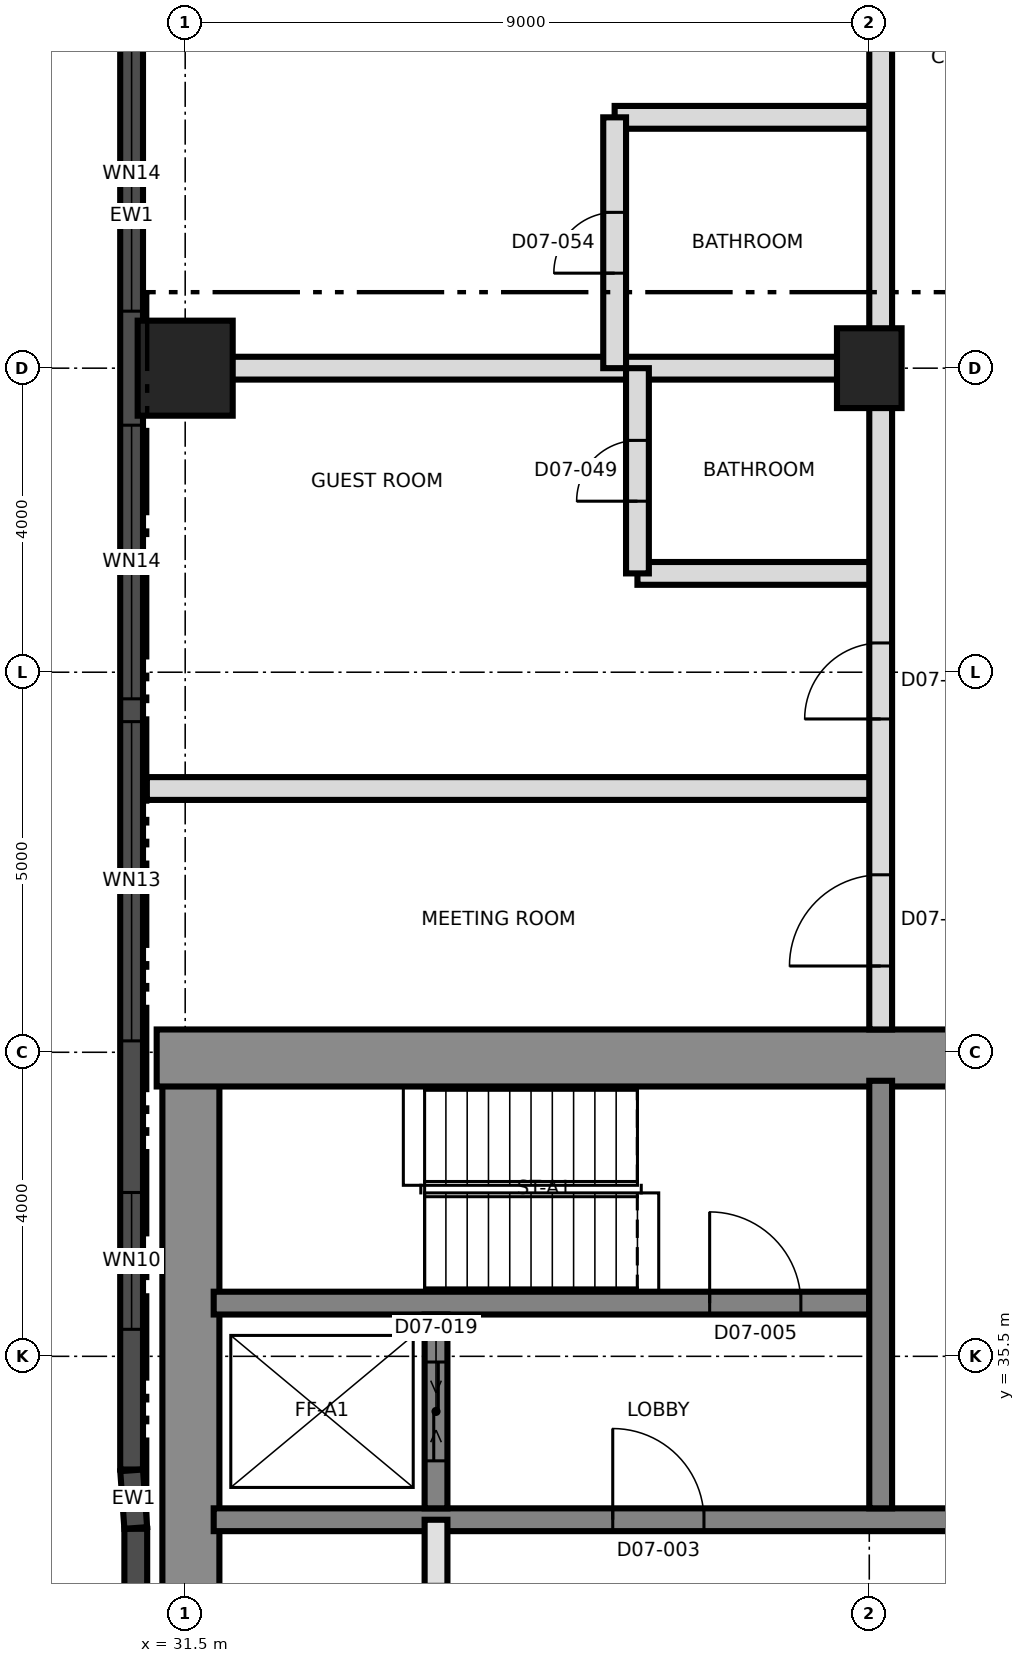
"""IFC4 building model, lengths in metres.
Left out: names, types, materials, properties, quantities, classifications, styles, units other than length and angle.
Written with IfcOpenShell. Run it as: python <this file> out.ifc"""

import sys

from ifc_helpers import new_model, si_unit, direction, frame, frame_2d, origin, origin_2d, place, context, subcontext, project, spatial, rectangle, extrude, element, fill, save


model = new_model("IFC4")
c1 = context("Model", 3, precision=1e-05, world=origin(), true_north=direction((0.0, 1.0)))
c2 = subcontext(c1, "Body", "Model", "MODEL_VIEW")
j1 = project(units=[si_unit("LENGTHUNIT", "METRE"), si_unit("PLANEANGLEUNIT", "RADIAN")], contexts=[c1])
p1 = place(None, origin())
s1 = spatial("IfcSite", under=j1, at=p1, CompositionType="ELEMENT")
p2 = place(p1, origin())
s2 = spatial("IfcBuilding", under=s1, at=p2, CompositionType="ELEMENT")
p3 = place(p2, frame((0.0, 0.0, 87.1)))
s3 = spatial("IfcBuildingStorey", under=s2, at=p3, CompositionType="ELEMENT", Elevation=87.1)
p4 = place(p3, frame((31.575, 21.875, 0.0), z_axis=(0.0, 0.0, 1.0), x_axis=(0.0, 1.0, 0.0)))
e1 = element("IfcWall", 1, at=p4, inside=s3, PredefinedType="SHEAR", context=c2, shape_type="SweptSolid", body=[
    extrude(rectangle(XDim=17.25, YDim=0.75, at=frame_2d((8.625, 0.0))), origin(), (0.0, 0.0, 1.0), 3.7),
])
p5 = place(p3, frame((31.125, 39.425, 0.0), z_axis=(0.0, 0.0, 1.0), x_axis=(1.0, 0.0, 0.0)))
e2 = element("IfcWall", 2, at=p5, inside=s3, PredefinedType="SHEAR", context=c2, shape_type="SweptSolid", body=[
    extrude(rectangle(XDim=27.0, YDim=0.75, at=frame_2d((13.5, 0.0))), origin(), (0.0, 0.0, 1.0), 3.7),
])
p6 = place(p5, frame((10.575, 0.0, 0.0)))
e3 = element("IfcOpeningElement", 3, at=p6, cuts=e2, PredefinedType="OPENING", context=c2, shape_type="SweptSolid", body=[
    extrude(rectangle(XDim=1.2, YDim=2.1, at=frame_2d((0.6, 1.05))), frame((0.0, 0.385, 0.0), z_axis=(0.0, -1.0, 0.0), x_axis=(1.0, 0.0, 0.0)), (0.0, 0.0, 1.0), 0.77),
])
p7 = place(p3, frame((31.875, 33.35, 0.0), z_axis=(0.0, 0.0, 1.0), x_axis=(1.0, 0.0, 0.0)))
e4 = element("IfcWall", 4, at=p7, inside=s3, PredefinedType="SHEAR", context=c2, shape_type="SweptSolid", body=[
    extrude(rectangle(XDim=26.25, YDim=0.3, at=frame_2d((13.125, 0.0))), origin(), (0.0, 0.0, 1.0), 3.7),
])
p8 = place(p7, frame((13.775, 0.0, 0.0)))
e5 = element("IfcOpeningElement", 5, at=p8, cuts=e4, PredefinedType="OPENING", context=c2, shape_type="SweptSolid", body=[
    extrude(rectangle(XDim=1.4, YDim=2.1, at=frame_2d((0.7, 1.05))), frame((0.0, 0.16, 0.0), z_axis=(0.0, -1.0, 0.0), x_axis=(1.0, 0.0, 0.0)), (0.0, 0.0, 1.0), 0.32),
])
p9 = place(p7, frame((5.25, 0.0, 0.0)))
e6 = element("IfcOpeningElement", 6, at=p9, cuts=e4, PredefinedType="OPENING", context=c2, shape_type="SweptSolid", body=[
    extrude(rectangle(XDim=1.2, YDim=2.1, at=frame_2d((0.6, 1.05))), frame((0.0, 0.16, 0.0), z_axis=(0.0, -1.0, 0.0), x_axis=(1.0, 0.0, 0.0)), (0.0, 0.0, 1.0), 0.32),
])
p10 = place(p7, frame((19.8, 0.0, 0.0)))
e7 = element("IfcOpeningElement", 7, at=p10, cuts=e4, PredefinedType="OPENING", context=c2, shape_type="SweptSolid", body=[
    extrude(rectangle(XDim=1.2, YDim=2.1, at=frame_2d((0.6, 1.05))), frame((0.0, 0.16, 0.0), z_axis=(0.0, -1.0, 0.0), x_axis=(1.0, 0.0, 0.0)), (0.0, 0.0, 1.0), 0.32),
])
p11 = place(p3, frame((31.875, 36.2, 0.0), z_axis=(0.0, 0.0, 1.0), x_axis=(1.0, 0.0, 0.0)))
e8 = element("IfcWall", 8, at=p11, inside=s3, PredefinedType="SHEAR", context=c2, shape_type="SweptSolid", body=[
    extrude(rectangle(XDim=8.625, YDim=0.3, at=frame_2d((4.312, 0.0))), origin(), (0.0, 0.0, 1.0), 3.7),
])
p12 = place(p11, frame((6.525, 0.0, 0.0)))
e9 = element("IfcOpeningElement", 9, at=p12, cuts=e8, PredefinedType="OPENING", context=c2, shape_type="SweptSolid", body=[
    extrude(rectangle(XDim=1.2, YDim=2.1, at=frame_2d((0.6, 1.05))), frame((0.0, 0.16, 0.0), z_axis=(0.0, -1.0, 0.0), x_axis=(1.0, 0.0, 0.0)), (0.0, 0.0, 1.0), 0.32),
])
p13 = place(p3, frame((40.65, 33.5, 0.0), z_axis=(0.0, 0.0, 1.0), x_axis=(0.0, 1.0, 0.0)))
e10 = element("IfcWall", 10, at=p13, inside=s3, PredefinedType="SHEAR", context=c2, shape_type="SweptSolid", body=[
    extrude(rectangle(XDim=5.625, YDim=0.3, at=frame_2d((2.812, 0.0))), origin(), (0.0, 0.0, 1.0), 3.7),
])
p14 = place(p3, frame((34.8, 33.5, 0.0), z_axis=(0.0, 0.0, 1.0), x_axis=(0.0, 1.0, 0.0)))
e11 = element("IfcWall", 11, at=p14, inside=s3, PredefinedType="SHEAR", context=c2, shape_type="SweptSolid", body=[
    extrude(rectangle(XDim=2.55, YDim=0.3, at=frame_2d((1.275, 0.0))), origin(), (0.0, 0.0, 1.0), 3.7),
])
p15 = place(p14, frame((0.625, 0.0, 0.0)))
e12 = element("IfcOpeningElement", 12, at=p15, cuts=e11, PredefinedType="OPENING", context=c2, shape_type="SweptSolid", body=[
    extrude(rectangle(XDim=1.3, YDim=2.4, at=frame_2d((0.65, 1.2))), frame((0.0, 0.16, 0.0), z_axis=(0.0, -1.0, 0.0), x_axis=(1.0, 0.0, 0.0)), (0.0, 0.0, 1.0), 0.32),
])
p16 = place(p3, frame((31.5, 48.5, 0.0), z_axis=(0.0, 0.0, 1.0), x_axis=(1.0, 0.0, 0.0)))
e13 = element("IfcColumn", 13, at=p16, inside=s3, PredefinedType="COLUMN", context=c2, shape_type="SweptSolid", body=[
    extrude(rectangle(XDim=1.25, YDim=1.25, at=origin_2d()), origin(), (0.0, 0.0, 1.0), 3.7),
])
p17 = place(p3, frame((40.5, 48.5, 0.0), z_axis=(0.0, 0.0, 1.0), x_axis=(0.0, 1.0, 0.0)))
e14 = element("IfcColumn", 14, at=p17, inside=s3, PredefinedType="COLUMN", context=c2, shape_type="SweptSolid", body=[
    extrude(rectangle(XDim=1.05, YDim=0.85, at=origin_2d()), origin(), (0.0, 0.0, 1.0), 3.7),
])
p18 = place(p3, frame((30.85, 33.231, 0.0), z_axis=(0.0, 0.0, 1.0), x_axis=(0.0, -1.0, 0.0)))
e15 = element("IfcWall", 15, at=p18, inside=s3, PredefinedType="SOLIDWALL", context=c2, shape_type="SweptSolid", body=[
    extrude(rectangle(XDim=11.871, YDim=0.3, at=frame_2d((5.936, 0.0))), origin(), (0.0, 0.0, 1.0), 3.4),
])
p19 = place(p3, frame((30.795, 66.992, 0.0), z_axis=(0.0, 0.0, 1.0), x_axis=(0.0, -1.0, 0.0)))
e16 = element("IfcWall", 16, at=p19, inside=s3, PredefinedType="SOLIDWALL", context=c2, shape_type="SweptSolid", body=[
    extrude(rectangle(XDim=32.981, YDim=0.3, at=frame_2d((16.491, 0.0))), origin(), (0.0, 0.0, 1.0), 3.4),
])
p20 = place(p19, frame((1.596, 0.0, 0.3)))
e17 = element("IfcOpeningElement", 17, at=p20, cuts=e16, PredefinedType="OPENING", context=c2, shape_type="SweptSolid", body=[
    extrude(rectangle(XDim=1.8, YDim=2.4, at=frame_2d((0.9, 1.2))), frame((0.0, 0.16, 0.0), z_axis=(0.0, -1.0, 0.0), x_axis=(1.0, 0.0, 0.0)), (0.0, 0.0, 1.0), 0.32),
])
p21 = place(p19, frame((5.142, 0.0, 0.9)))
e18 = element("IfcOpeningElement", 18, at=p21, cuts=e16, PredefinedType="OPENING", context=c2, shape_type="SweptSolid", body=[
    extrude(rectangle(XDim=3.6, YDim=1.7, at=frame_2d((1.8, 0.85))), frame((0.0, 0.16, 0.0), z_axis=(0.0, -1.0, 0.0), x_axis=(1.0, 0.0, 0.0)), (0.0, 0.0, 1.0), 0.32),
])
p22 = place(p19, frame((10.242, 0.0, 0.9)))
e19 = element("IfcOpeningElement", 19, at=p22, cuts=e16, PredefinedType="OPENING", context=c2, shape_type="SweptSolid", body=[
    extrude(rectangle(XDim=3.6, YDim=1.7, at=frame_2d((1.8, 0.85))), frame((0.0, 0.16, 0.0), z_axis=(0.0, -1.0, 0.0), x_axis=(1.0, 0.0, 0.0)), (0.0, 0.0, 1.0), 0.32),
])
p23 = place(p19, frame((14.142, 0.0, 0.9)))
e20 = element("IfcOpeningElement", 20, at=p23, cuts=e16, PredefinedType="OPENING", context=c2, shape_type="SweptSolid", body=[
    extrude(rectangle(XDim=3.6, YDim=1.7, at=frame_2d((1.8, 0.85))), frame((0.0, 0.16, 0.0), z_axis=(0.0, -1.0, 0.0), x_axis=(1.0, 0.0, 0.0)), (0.0, 0.0, 1.0), 0.32),
])
p24 = place(p19, frame((19.242, 0.0, 0.9)))
e21 = element("IfcOpeningElement", 21, at=p24, cuts=e16, PredefinedType="OPENING", context=c2, shape_type="SweptSolid", body=[
    extrude(rectangle(XDim=3.6, YDim=1.7, at=frame_2d((1.8, 0.85))), frame((0.0, 0.16, 0.0), z_axis=(0.0, -1.0, 0.0), x_axis=(1.0, 0.0, 0.0)), (0.0, 0.0, 1.0), 0.32),
])
p25 = place(p19, frame((23.142, 0.0, 0.9)))
e22 = element("IfcOpeningElement", 22, at=p25, cuts=e16, PredefinedType="OPENING", context=c2, shape_type="SweptSolid", body=[
    extrude(rectangle(XDim=4.2, YDim=1.7, at=frame_2d((2.1, 0.85))), frame((0.0, 0.16, 0.0), z_axis=(0.0, -1.0, 0.0), x_axis=(1.0, 0.0, 0.0)), (0.0, 0.0, 1.0), 0.32),
])
p26 = place(p19, frame((29.337, 0.0, 0.3)))
e23 = element("IfcOpeningElement", 23, at=p26, cuts=e16, PredefinedType="OPENING", context=c2, shape_type="SweptSolid", body=[
    extrude(rectangle(XDim=1.8, YDim=2.4, at=frame_2d((0.9, 1.2))), frame((0.0, 0.16, 0.0), z_axis=(0.0, -1.0, 0.0), x_axis=(1.0, 0.0, 0.0)), (0.0, 0.0, 1.0), 0.32),
])
p27 = place(p3, frame((30.795, 34.0, 0.0), z_axis=(0.0, 0.0, 1.0), x_axis=(0.07129269393, -0.997455438499, 0.0)))
e24 = element("IfcWall", 24, at=p27, inside=s3, PredefinedType="SOLIDWALL", context=c2, shape_type="SweptSolid", body=[
    extrude(rectangle(XDim=0.76, YDim=0.3, at=frame_2d((0.38, 0.0))), origin(), (0.0, 0.0, 1.0), 3.4),
])
p28 = place(p3, frame((34.8, 27.9, 0.0), z_axis=(0.0, 0.0, 1.0), x_axis=(0.0, 1.0, 0.0)))
e25 = element("IfcWall", 25, at=p28, inside=s3, PredefinedType="SOLIDWALL", context=c2, shape_type="SweptSolid", body=[
    extrude(rectangle(XDim=5.45, YDim=0.3, at=frame_2d((2.725, 0.0))), origin(), (0.0, 0.0, 1.0), 3.4),
])
p29 = place(p28, frame((3.6, 0.0, 0.0)))
e26 = element("IfcOpeningElement", 26, at=p29, cuts=e25, PredefinedType="OPENING", context=c2, shape_type="SweptSolid", body=[
    extrude(rectangle(XDim=1.0, YDim=2.1, at=frame_2d((0.5, 1.05))), frame((0.0, 0.16, 0.0), z_axis=(0.0, -1.0, 0.0), x_axis=(1.0, 0.0, 0.0)), (0.0, 0.0, 1.0), 0.32),
])
p30 = place(p3, frame((30.995, 42.97, 0.0), z_axis=(0.0, 0.0, 1.0), x_axis=(1.0, 0.0, 0.0)))
e27 = element("IfcWall", 27, at=p30, inside=s3, PredefinedType="PARTITIONING", context=c2, shape_type="SweptSolid", body=[
    extrude(rectangle(XDim=9.655, YDim=0.3, at=frame_2d((4.827, 0.0))), origin(), (0.0, 0.0, 1.0), 3.4),
])
p31 = place(p3, frame((37.45, 45.8, 0.0), z_axis=(0.0, 0.0, 1.0), x_axis=(1.0, 0.0, 0.0)))
e28 = element("IfcWall", 28, at=p31, inside=s3, PredefinedType="PARTITIONING", context=c2, shape_type="SweptSolid", body=[
    extrude(rectangle(XDim=3.2, YDim=0.3, at=frame_2d((1.6, 0.0))), origin(), (0.0, 0.0, 1.0), 3.4),
])
p32 = place(p3, frame((30.995, 48.5, 0.0), z_axis=(0.0, 0.0, 1.0), x_axis=(1.0, 0.0, 0.0)))
e29 = element("IfcWall", 29, at=p32, inside=s3, PredefinedType="PARTITIONING", context=c2, shape_type="SweptSolid", body=[
    extrude(rectangle(XDim=9.655, YDim=0.3, at=frame_2d((4.827, 0.0))), origin(), (0.0, 0.0, 1.0), 3.4),
])
p33 = place(p3, frame((37.15, 51.8, 0.0), z_axis=(0.0, 0.0, 1.0), x_axis=(1.0, 0.0, 0.0)))
e30 = element("IfcWall", 30, at=p33, inside=s3, PredefinedType="PARTITIONING", context=c2, shape_type="SweptSolid", body=[
    extrude(rectangle(XDim=3.5, YDim=0.3, at=frame_2d((1.75, 0.0))), origin(), (0.0, 0.0, 1.0), 3.4),
])
p34 = place(p3, frame((37.15, 48.5, 0.0), z_axis=(0.0, 0.0, 1.0), x_axis=(0.0, 1.0, 0.0)))
e31 = element("IfcWall", 31, at=p34, inside=s3, PredefinedType="PARTITIONING", context=c2, shape_type="SweptSolid", body=[
    extrude(rectangle(XDim=3.3, YDim=0.3, at=frame_2d((1.65, 0.0))), origin(), (0.0, 0.0, 1.0), 3.4),
])
p35 = place(p34, frame((1.25, 0.0, 0.0)))
e32 = element("IfcOpeningElement", 32, at=p35, cuts=e31, PredefinedType="OPENING", context=c2, shape_type="SweptSolid", body=[
    extrude(rectangle(XDim=0.8, YDim=2.1, at=frame_2d((0.4, 1.05))), frame((0.0, 0.16, 0.0), z_axis=(0.0, -1.0, 0.0), x_axis=(1.0, 0.0, 0.0)), (0.0, 0.0, 1.0), 0.32),
])
p36 = place(p3, frame((37.45, 45.8, 0.0), z_axis=(0.0, 0.0, 1.0), x_axis=(0.0, 1.0, 0.0)))
e33 = element("IfcWall", 33, at=p36, inside=s3, PredefinedType="PARTITIONING", context=c2, shape_type="SweptSolid", body=[
    extrude(rectangle(XDim=2.7, YDim=0.3, at=frame_2d((1.35, 0.0))), origin(), (0.0, 0.0, 1.0), 3.4),
])
p37 = place(p36, frame((0.95, 0.0, 0.0)))
e34 = element("IfcOpeningElement", 34, at=p37, cuts=e33, PredefinedType="OPENING", context=c2, shape_type="SweptSolid", body=[
    extrude(rectangle(XDim=0.8, YDim=2.1, at=frame_2d((0.4, 1.05))), frame((0.0, 0.16, 0.0), z_axis=(0.0, -1.0, 0.0), x_axis=(1.0, 0.0, 0.0)), (0.0, 0.0, 1.0), 0.32),
])
p38 = place(p3, frame((40.65, 39.8, 0.0), z_axis=(0.0, 0.0, 1.0), x_axis=(0.0, 1.0, 0.0)))
e35 = element("IfcWall", 35, at=p38, inside=s3, PredefinedType="PARTITIONING", context=c2, shape_type="SweptSolid", body=[
    extrude(rectangle(XDim=36.205, YDim=0.3, at=frame_2d((18.103, 0.0))), origin(), (0.0, 0.0, 1.0), 3.4),
])
p39 = place(p38, frame((0.835, 0.0, 0.0)))
e36 = element("IfcOpeningElement", 36, at=p39, cuts=e35, PredefinedType="OPENING", context=c2, shape_type="SweptSolid", body=[
    extrude(rectangle(XDim=1.2, YDim=2.1, at=frame_2d((0.6, 1.05))), frame((0.0, 0.16, 0.0), z_axis=(0.0, -1.0, 0.0), x_axis=(1.0, 0.0, 0.0)), (0.0, 0.0, 1.0), 0.32),
])
p40 = place(p38, frame((4.085, 0.0, 0.0)))
e37 = element("IfcOpeningElement", 37, at=p40, cuts=e35, PredefinedType="OPENING", context=c2, shape_type="SweptSolid", body=[
    extrude(rectangle(XDim=1.0, YDim=2.1, at=frame_2d((0.5, 1.05))), frame((0.0, 0.16, 0.0), z_axis=(0.0, -1.0, 0.0), x_axis=(1.0, 0.0, 0.0)), (0.0, 0.0, 1.0), 0.32),
])
p41 = place(p38, frame((14.35, 0.0, 0.0)))
e38 = element("IfcOpeningElement", 38, at=p41, cuts=e35, PredefinedType="OPENING", context=c2, shape_type="SweptSolid", body=[
    extrude(rectangle(XDim=1.0, YDim=2.4, at=frame_2d((0.5, 1.2))), frame((0.0, 0.16, 0.0), z_axis=(0.0, -1.0, 0.0), x_axis=(1.0, 0.0, 0.0)), (0.0, 0.0, 1.0), 0.32),
])
p42 = place(p38, frame((21.2, 0.0, 0.0)))
e39 = element("IfcOpeningElement", 39, at=p42, cuts=e35, PredefinedType="OPENING", context=c2, shape_type="SweptSolid", body=[
    extrude(rectangle(XDim=1.0, YDim=2.4, at=frame_2d((0.5, 1.2))), frame((0.0, 0.16, 0.0), z_axis=(0.0, -1.0, 0.0), x_axis=(1.0, 0.0, 0.0)), (0.0, 0.0, 1.0), 0.32),
])
p43 = place(p23, origin())
e40 = element("IfcWindow", 40, at=p43, inside=s3, PartitioningType="SINGLE_PANEL", PredefinedType="WINDOW", context=c2, shape_type="SweptSolid", body=[
    extrude(rectangle(XDim=3.6, YDim=1.7, at=frame_2d((1.8, 0.85))), frame((0.0, 0.03, 0.0), z_axis=(0.0, -1.0, 0.0), x_axis=(1.0, 0.0, 0.0)), (0.0, 0.0, 1.0), 0.06),
])
fill(e20, e40)
p44 = place(p24, origin())
e41 = element("IfcWindow", 41, at=p44, inside=s3, PartitioningType="SINGLE_PANEL", PredefinedType="WINDOW", context=c2, shape_type="SweptSolid", body=[
    extrude(rectangle(XDim=3.6, YDim=1.7, at=frame_2d((1.8, 0.85))), frame((0.0, 0.03, 0.0), z_axis=(0.0, -1.0, 0.0), x_axis=(1.0, 0.0, 0.0)), (0.0, 0.0, 1.0), 0.06),
])
fill(e21, e41)
p45 = place(p25, origin())
e42 = element("IfcWindow", 42, at=p45, inside=s3, PartitioningType="SINGLE_PANEL", PredefinedType="WINDOW", context=c2, shape_type="SweptSolid", body=[
    extrude(rectangle(XDim=4.2, YDim=1.7, at=frame_2d((2.1, 0.85))), frame((0.0, 0.03, 0.0), z_axis=(0.0, -1.0, 0.0), x_axis=(1.0, 0.0, 0.0)), (0.0, 0.0, 1.0), 0.06),
])
fill(e22, e42)
p46 = place(p26, origin())
e43 = element("IfcWindow", 43, at=p46, inside=s3, PartitioningType="SINGLE_PANEL", PredefinedType="WINDOW", context=c2, shape_type="SweptSolid", body=[
    extrude(rectangle(XDim=1.8, YDim=2.4, at=frame_2d((0.9, 1.2))), frame((0.0, 0.03, 0.0), z_axis=(0.0, -1.0, 0.0), x_axis=(1.0, 0.0, 0.0)), (0.0, 0.0, 1.0), 0.06),
])
fill(e23, e43)
p47 = place(p9, origin())
e44 = element("IfcDoor", 44, at=p47, inside=s3, OperationType="SINGLE_SWING_LEFT", PredefinedType="DOOR", context=c2, shape_type="SweptSolid", body=[
    extrude(rectangle(XDim=1.2, YDim=2.1, at=frame_2d((0.6, 1.05))), frame((0.0, 0.025, 0.0), z_axis=(0.0, -1.0, 0.0), x_axis=(1.0, 0.0, 0.0)), (0.0, 0.0, 1.0), 0.05),
])
fill(e6, e44)
p48 = place(p12, origin())
e45 = element("IfcDoor", 45, at=p48, inside=s3, OperationType="SINGLE_SWING_RIGHT", PredefinedType="DOOR", context=c2, shape_type="SweptSolid", body=[
    extrude(rectangle(XDim=1.2, YDim=2.1, at=frame_2d((0.6, 1.05))), frame((0.0, 0.025, 0.0), z_axis=(0.0, -1.0, 0.0), x_axis=(1.0, 0.0, 0.0)), (0.0, 0.0, 1.0), 0.05),
])
fill(e9, e45)
p49 = place(p15, origin())
e46 = element("IfcDoor", 46, at=p49, inside=s3, OperationType="SLIDING_TO_LEFT", PredefinedType="DOOR", context=c2, shape_type="SweptSolid", body=[
    extrude(rectangle(XDim=1.3, YDim=2.4, at=frame_2d((0.65, 1.2))), frame((0.0, 0.025, 0.0), z_axis=(0.0, -1.0, 0.0), x_axis=(1.0, 0.0, 0.0)), (0.0, 0.0, 1.0), 0.05),
])
fill(e12, e46)
p50 = place(p39, origin())
e47 = element("IfcDoor", 47, at=p50, inside=s3, OperationType="SINGLE_SWING_LEFT", PredefinedType="DOOR", context=c2, shape_type="SweptSolid", body=[
    extrude(rectangle(XDim=1.2, YDim=2.1, at=frame_2d((0.6, 1.05))), frame((0.0, 0.025, 0.0), z_axis=(0.0, -1.0, 0.0), x_axis=(1.0, 0.0, 0.0)), (0.0, 0.0, 1.0), 0.05),
])
fill(e36, e47)
p51 = place(p37, origin())
e48 = element("IfcDoor", 48, at=p51, inside=s3, OperationType="SINGLE_SWING_LEFT", PredefinedType="DOOR", context=c2, shape_type="SweptSolid", body=[
    extrude(rectangle(XDim=0.8, YDim=2.1, at=frame_2d((0.4, 1.05))), frame((0.0, 0.025, 0.0), z_axis=(0.0, -1.0, 0.0), x_axis=(1.0, 0.0, 0.0)), (0.0, 0.0, 1.0), 0.05),
])
fill(e34, e48)
p52 = place(p40, origin())
e49 = element("IfcDoor", 49, at=p52, inside=s3, OperationType="SINGLE_SWING_RIGHT", PredefinedType="DOOR", context=c2, shape_type="SweptSolid", body=[
    extrude(rectangle(XDim=1.0, YDim=2.1, at=frame_2d((0.5, 1.05))), frame((0.0, 0.025, 0.0), z_axis=(0.0, -1.0, 0.0), x_axis=(1.0, 0.0, 0.0)), (0.0, 0.0, 1.0), 0.05),
])
fill(e37, e49)
p53 = place(p35, origin())
e50 = element("IfcDoor", 50, at=p53, inside=s3, OperationType="SINGLE_SWING_RIGHT", PredefinedType="DOOR", context=c2, shape_type="SweptSolid", body=[
    extrude(rectangle(XDim=0.8, YDim=2.1, at=frame_2d((0.4, 1.05))), frame((0.0, 0.025, 0.0), z_axis=(0.0, -1.0, 0.0), x_axis=(1.0, 0.0, 0.0)), (0.0, 0.0, 1.0), 0.05),
])
fill(e32, e50)
save(model, sys.argv[1])
